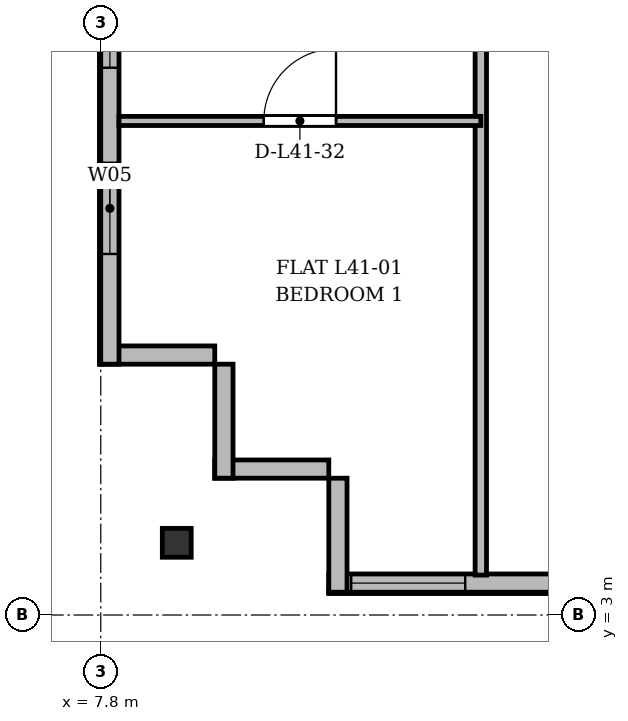
"""IFC4 building model, lengths in metres.
Left out: names, types, materials, properties, quantities, classifications, styles, units other than length and angle.
Written with IfcOpenShell. Run it as: python <this file> out.ifc"""

import sys

from ifc_helpers import new_model, si_unit, direction, frame, frame_2d, origin, origin_2d, place, context, subcontext, project, spatial, rectangle, i_section, extrude, source, transform, mapped, element, fill, save


model = new_model("IFC4")
c1 = context("Model", 3, precision=1e-05, world=origin(), true_north=direction((0.0, 1.0)))
c2 = subcontext(c1, "Body", "Model", "MODEL_VIEW")
j1 = project(units=[si_unit("LENGTHUNIT", "METRE"), si_unit("PLANEANGLEUNIT", "RADIAN")], contexts=[c1])
p1 = place(None, origin())
s1 = spatial("IfcSite", under=j1, at=p1, CompositionType="ELEMENT")
p2 = place(p1, origin())
s2 = spatial("IfcBuilding", under=s1, at=p2, CompositionType="ELEMENT")
p3 = place(p2, frame((0.0, 0.0, 157.3)))
s3 = spatial("IfcBuildingStorey", under=s2, at=p3, CompositionType="ELEMENT", Elevation=157.3)
m1 = source(origin(), c2, "Body", "SweptSolid", [
    extrude(i_section(OverallWidth=0.38, OverallDepth=0.38, WebThickness=0.02, FlangeThickness=0.03, at=origin_2d()), origin(), (0.0, 0.0, 1.0), 3.6),
])
p4 = place(p3, frame((8.8, 3.95, 0.0), z_axis=(0.0, 0.0, 1.0), x_axis=(1.0, 0.0, 0.0)))
e1 = element("IfcColumn", 1, at=p4, inside=s3, PredefinedType="COLUMN", context=c2, shape_type="MappedRepresentation", body=[
    mapped(m1, transform((0.0, 0.0, 0.0), x_axis=(1.0, 0.0, 0.0), y_axis=(0.0, 1.0, 0.0), z_axis=(0.0, 0.0, 1.0), scale=1.0)),
])
for number, where, z_axis, x_axis in (
    (2, (10.8, 4.92, 0.0), (0.0, 0.0, 1.0), (-1.0, 0.0, 0.0)),
    (3, (9.42, 4.8, 0.0), (0.0, 0.0, 1.0), (0.0, 1.0, 0.0)),
):
    element("IfcWall", number, at=place(p3, frame(where, z_axis=z_axis, x_axis=x_axis)), inside=s3, PredefinedType="SOLIDWALL", context=c2, shape_type="SweptSolid", body=[
        extrude(rectangle(XDim=1.5, YDim=0.24, at=frame_2d((0.75, 0.0))), origin(), (0.0, 0.0, 1.0), 3.35),
    ])
p5 = place(p3, frame((9.3, 6.42, 0.0), z_axis=(0.0, 0.0, 1.0), x_axis=(-1.0, 0.0, 0.0)))
e4 = element("IfcWall", 4, at=p5, inside=s3, PredefinedType="SOLIDWALL", context=c2, shape_type="SweptSolid", body=[
    extrude(rectangle(XDim=1.5, YDim=0.24, at=frame_2d((0.75, 0.0))), origin(), (0.0, 0.0, 1.0), 2.85),
])
p6 = place(p3, frame((7.92, 6.3, 0.0), z_axis=(0.0, 0.0, 1.0), x_axis=(0.0, 1.0, 0.0)))
e5 = element("IfcWall", 5, at=p6, inside=s3, PredefinedType="SOLIDWALL", context=c2, shape_type="SweptSolid", body=[
    extrude(rectangle(XDim=39.2, YDim=0.24, at=frame_2d((19.6, 0.0))), origin(), (0.0, 0.0, 1.0), 3.35),
])
p7 = place(p6, frame((1.45, 0.0, 0.92)))
e6 = element("IfcOpeningElement", 6, at=p7, cuts=e5, PredefinedType="OPENING", context=c2, shape_type="SweptSolid", body=[
    extrude(rectangle(XDim=1.2, YDim=1.65, at=frame_2d((0.6, 0.825))), frame((0.0, 0.13, 0.0), z_axis=(0.0, -1.0, 0.0), x_axis=(1.0, 0.0, 0.0)), (0.0, 0.0, 1.0), 0.26),
])
p8 = place(p6, frame((3.9, 0.0, 0.92)))
e7 = element("IfcOpeningElement", 7, at=p8, cuts=e5, PredefinedType="OPENING", context=c2, shape_type="SweptSolid", body=[
    extrude(rectangle(XDim=2.4, YDim=2.1, at=frame_2d((1.2, 1.05))), frame((0.0, 0.13, 0.0), z_axis=(0.0, -1.0, 0.0), x_axis=(1.0, 0.0, 0.0)), (0.0, 0.0, 1.0), 0.26),
])
p9 = place(p6, frame((8.1, 0.0, 0.92)))
e8 = element("IfcOpeningElement", 8, at=p9, cuts=e5, PredefinedType="OPENING", context=c2, shape_type="SweptSolid", body=[
    extrude(rectangle(XDim=2.4, YDim=2.1, at=frame_2d((1.2, 1.05))), frame((0.0, 0.13, 0.0), z_axis=(0.0, -1.0, 0.0), x_axis=(1.0, 0.0, 0.0)), (0.0, 0.0, 1.0), 0.26),
])
p10 = place(p6, frame((15.3, 0.0, 0.92)))
e9 = element("IfcOpeningElement", 9, at=p10, cuts=e5, PredefinedType="OPENING", context=c2, shape_type="SweptSolid", body=[
    extrude(rectangle(XDim=2.4, YDim=2.1, at=frame_2d((1.2, 1.05))), frame((0.0, 0.13, 0.0), z_axis=(0.0, -1.0, 0.0), x_axis=(1.0, 0.0, 0.0)), (0.0, 0.0, 1.0), 0.26),
])
p11 = place(p6, frame((29.3, 0.0, 0.92)))
e10 = element("IfcOpeningElement", 10, at=p11, cuts=e5, PredefinedType="OPENING", context=c2, shape_type="SweptSolid", body=[
    extrude(rectangle(XDim=2.4, YDim=2.1, at=frame_2d((1.2, 1.05))), frame((0.0, 0.13, 0.0), z_axis=(0.0, -1.0, 0.0), x_axis=(1.0, 0.0, 0.0)), (0.0, 0.0, 1.0), 0.26),
])
p12 = place(p6, frame((33.5, 0.0, 0.92)))
e11 = element("IfcOpeningElement", 11, at=p12, cuts=e5, PredefinedType="OPENING", context=c2, shape_type="SweptSolid", body=[
    extrude(rectangle(XDim=1.2, YDim=1.65, at=frame_2d((0.6, 0.825))), frame((0.0, 0.13, 0.0), z_axis=(0.0, -1.0, 0.0), x_axis=(1.0, 0.0, 0.0)), (0.0, 0.0, 1.0), 0.26),
])
p13 = place(p6, frame((36.85, 0.0, 0.92)))
e12 = element("IfcOpeningElement", 12, at=p13, cuts=e5, PredefinedType="OPENING", context=c2, shape_type="SweptSolid", body=[
    extrude(rectangle(XDim=1.2, YDim=1.65, at=frame_2d((0.6, 0.825))), frame((0.0, 0.13, 0.0), z_axis=(0.0, -1.0, 0.0), x_axis=(1.0, 0.0, 0.0)), (0.0, 0.0, 1.0), 0.26),
])
p14 = place(p3, frame((63.6, 3.42, 0.0), z_axis=(0.0, 0.0, 1.0), x_axis=(-1.0, 0.0, 0.0)))
e13 = element("IfcWall", 13, at=p14, inside=s3, PredefinedType="SOLIDWALL", context=c2, shape_type="SweptSolid", body=[
    extrude(rectangle(XDim=52.8, YDim=0.24, at=frame_2d((26.4, 0.0))), origin(), (0.0, 0.0, 1.0), 3.35),
])
p15 = place(p14, frame((0.295, 0.0, 0.9)))
e14 = element("IfcOpeningElement", 14, at=p15, cuts=e13, PredefinedType="OPENING", context=c2, shape_type="SweptSolid", body=[
    extrude(rectangle(XDim=1.5, YDim=1.75, at=frame_2d((0.75, 0.875))), frame((0.0, 0.13, 0.0), z_axis=(0.0, -1.0, 0.0), x_axis=(1.0, 0.0, 0.0)), (0.0, 0.0, 1.0), 0.26),
])
p16 = place(p14, frame((3.95, 0.0, 0.9)))
e15 = element("IfcOpeningElement", 15, at=p16, cuts=e13, PredefinedType="OPENING", context=c2, shape_type="SweptSolid", body=[
    extrude(rectangle(XDim=1.5, YDim=1.75, at=frame_2d((0.75, 0.875))), frame((0.0, 0.13, 0.0), z_axis=(0.0, -1.0, 0.0), x_axis=(1.0, 0.0, 0.0)), (0.0, 0.0, 1.0), 0.26),
])
p17 = place(p14, frame((7.635, 0.0, 0.0)))
e16 = element("IfcOpeningElement", 16, at=p17, cuts=e13, PredefinedType="OPENING", context=c2, shape_type="SweptSolid", body=[
    extrude(rectangle(XDim=1.2, YDim=2.2, at=frame_2d((0.6, 1.1))), frame((0.0, 0.13, 0.0), z_axis=(0.0, -1.0, 0.0), x_axis=(1.0, 0.0, 0.0)), (0.0, 0.0, 1.0), 0.26),
])
p18 = place(p14, frame((9.775, 0.0, 0.9)))
e17 = element("IfcOpeningElement", 17, at=p18, cuts=e13, PredefinedType="OPENING", context=c2, shape_type="SweptSolid", body=[
    extrude(rectangle(XDim=1.65, YDim=1.85, at=frame_2d((0.825, 0.925))), frame((0.0, 0.13, 0.0), z_axis=(0.0, -1.0, 0.0), x_axis=(1.0, 0.0, 0.0)), (0.0, 0.0, 1.0), 0.26),
])
p19 = place(p14, frame((12.1, 0.0, 0.9)))
e18 = element("IfcOpeningElement", 18, at=p19, cuts=e13, PredefinedType="OPENING", context=c2, shape_type="SweptSolid", body=[
    extrude(rectangle(XDim=1.8, YDim=1.8, at=frame_2d((0.9, 0.9))), frame((0.0, 0.13, 0.0), z_axis=(0.0, -1.0, 0.0), x_axis=(1.0, 0.0, 0.0)), (0.0, 0.0, 1.0), 0.26),
])
p20 = place(p14, frame((15.9, 0.0, 0.9)))
e19 = element("IfcOpeningElement", 19, at=p20, cuts=e13, PredefinedType="OPENING", context=c2, shape_type="SweptSolid", body=[
    extrude(rectangle(XDim=2.2, YDim=1.8, at=frame_2d((1.1, 0.9))), frame((0.0, 0.13, 0.0), z_axis=(0.0, -1.0, 0.0), x_axis=(1.0, 0.0, 0.0)), (0.0, 0.0, 1.0), 0.26),
])
p21 = place(p14, frame((22.65, 0.0, 0.9)))
e20 = element("IfcOpeningElement", 20, at=p21, cuts=e13, PredefinedType="OPENING", context=c2, shape_type="SweptSolid", body=[
    extrude(rectangle(XDim=1.5, YDim=1.75, at=frame_2d((0.75, 0.875))), frame((0.0, 0.13, 0.0), z_axis=(0.0, -1.0, 0.0), x_axis=(1.0, 0.0, 0.0)), (0.0, 0.0, 1.0), 0.26),
])
p22 = place(p14, frame((27.5, 0.0, 0.9)))
e21 = element("IfcOpeningElement", 21, at=p22, cuts=e13, PredefinedType="OPENING", context=c2, shape_type="SweptSolid", body=[
    extrude(rectangle(XDim=2.0, YDim=1.95, at=frame_2d((1.0, 0.975))), frame((0.0, 0.13, 0.0), z_axis=(0.0, -1.0, 0.0), x_axis=(1.0, 0.0, 0.0)), (0.0, 0.0, 1.0), 0.26),
])
p23 = place(p14, frame((30.675, 0.0, 0.9)))
e22 = element("IfcOpeningElement", 22, at=p23, cuts=e13, PredefinedType="OPENING", context=c2, shape_type="SweptSolid", body=[
    extrude(rectangle(XDim=1.65, YDim=1.85, at=frame_2d((0.825, 0.925))), frame((0.0, 0.13, 0.0), z_axis=(0.0, -1.0, 0.0), x_axis=(1.0, 0.0, 0.0)), (0.0, 0.0, 1.0), 0.26),
])
p24 = place(p14, frame((34.3, 0.0, 0.9)))
e23 = element("IfcOpeningElement", 23, at=p24, cuts=e13, PredefinedType="OPENING", context=c2, shape_type="SweptSolid", body=[
    extrude(rectangle(XDim=1.8, YDim=1.8, at=frame_2d((0.9, 0.9))), frame((0.0, 0.13, 0.0), z_axis=(0.0, -1.0, 0.0), x_axis=(1.0, 0.0, 0.0)), (0.0, 0.0, 1.0), 0.26),
])
p25 = place(p14, frame((39.3, 0.0, 0.9)))
e24 = element("IfcOpeningElement", 24, at=p25, cuts=e13, PredefinedType="OPENING", context=c2, shape_type="SweptSolid", body=[
    extrude(rectangle(XDim=2.2, YDim=1.8, at=frame_2d((1.1, 0.9))), frame((0.0, 0.13, 0.0), z_axis=(0.0, -1.0, 0.0), x_axis=(1.0, 0.0, 0.0)), (0.0, 0.0, 1.0), 0.26),
])
p26 = place(p14, frame((43.65, 0.0, 0.9)))
e25 = element("IfcOpeningElement", 25, at=p26, cuts=e13, PredefinedType="OPENING", context=c2, shape_type="SweptSolid", body=[
    extrude(rectangle(XDim=1.5, YDim=1.75, at=frame_2d((0.75, 0.875))), frame((0.0, 0.13, 0.0), z_axis=(0.0, -1.0, 0.0), x_axis=(1.0, 0.0, 0.0)), (0.0, 0.0, 1.0), 0.26),
])
p27 = place(p14, frame((47.1, 0.0, 0.9)))
e26 = element("IfcOpeningElement", 26, at=p27, cuts=e13, PredefinedType="OPENING", context=c2, shape_type="SweptSolid", body=[
    extrude(rectangle(XDim=2.0, YDim=1.95, at=frame_2d((1.0, 0.975))), frame((0.0, 0.13, 0.0), z_axis=(0.0, -1.0, 0.0), x_axis=(1.0, 0.0, 0.0)), (0.0, 0.0, 1.0), 0.26),
])
p28 = place(p14, frame((51.005, 0.0, 0.9)))
e27 = element("IfcOpeningElement", 27, at=p28, cuts=e13, PredefinedType="OPENING", context=c2, shape_type="SweptSolid", body=[
    extrude(rectangle(XDim=1.5, YDim=1.75, at=frame_2d((0.75, 0.875))), frame((0.0, 0.13, 0.0), z_axis=(0.0, -1.0, 0.0), x_axis=(1.0, 0.0, 0.0)), (0.0, 0.0, 1.0), 0.26),
])
p29 = place(p14, frame((37.85, 0.0, 0.0)))
e28 = element("IfcOpeningElement", 28, at=p29, cuts=e13, PredefinedType="OPENING", context=c2, shape_type="SweptSolid", body=[
    extrude(rectangle(XDim=1.2, YDim=2.2, at=frame_2d((0.6, 1.1))), frame((0.0, 0.13, 0.0), z_axis=(0.0, -1.0, 0.0), x_axis=(1.0, 0.0, 0.0)), (0.0, 0.0, 1.0), 0.26),
])
p30 = place(p3, frame((10.92, 3.3, 0.0), z_axis=(0.0, 0.0, 1.0), x_axis=(0.0, 1.0, 0.0)))
e29 = element("IfcWall", 29, at=p30, inside=s3, PredefinedType="SOLIDWALL", context=c2, shape_type="SweptSolid", body=[
    extrude(rectangle(XDim=1.5, YDim=0.24, at=frame_2d((0.75, 0.0))), origin(), (0.0, 0.0, 1.0), 2.75),
])
p31 = place(p3, frame((12.8, 3.525, 0.0), z_axis=(0.0, 0.0, 1.0), x_axis=(0.0, 1.0, 0.0)))
e30 = element("IfcWall", 30, at=p31, inside=s3, PredefinedType="PARTITIONING", context=c2, shape_type="SweptSolid", body=[
    extrude(rectangle(XDim=27.275, YDim=0.15, at=frame_2d((13.638, 0.0))), origin(), (0.0, 0.0, 1.0), 2.75),
])
p32 = place(p3, frame((8.04, 9.5, 0.0), z_axis=(0.0, 0.0, 1.0), x_axis=(1.0, 0.0, 0.0)))
e31 = element("IfcWall", 31, at=p32, inside=s3, PredefinedType="PARTITIONING", context=c2, shape_type="SweptSolid", body=[
    extrude(rectangle(XDim=4.76, YDim=0.12, at=frame_2d((2.38, 0.0))), origin(), (0.0, 0.0, 1.0), 2.85),
])
p33 = place(p32, frame((1.905, 0.0, 0.0)))
e32 = element("IfcOpeningElement", 32, at=p33, cuts=e31, PredefinedType="OPENING", context=c2, shape_type="SweptSolid", body=[
    extrude(rectangle(XDim=0.95, YDim=2.15, at=frame_2d((0.475, 1.075))), frame((0.0, 0.07, 0.0), z_axis=(0.0, -1.0, 0.0), x_axis=(1.0, 0.0, 0.0)), (0.0, 0.0, 1.0), 0.14),
])
m2 = source(origin(), c2, "Body", "SweptSolid", [
    extrude(rectangle(XDim=1.2, YDim=1.65, at=frame_2d((0.6, 0.825))), frame((0.0, 0.03, 0.0), z_axis=(0.0, -1.0, 0.0), x_axis=(1.0, 0.0, 0.0)), (0.0, 0.0, 1.0), 0.06),
])
p34 = place(p7, origin())
e33 = element("IfcWindow", 33, at=p34, inside=s3, PartitioningType="SINGLE_PANEL", PredefinedType="WINDOW", context=c2, shape_type="MappedRepresentation", body=[
    mapped(m2, transform((0.0, 0.0, 0.0), x_axis=(1.0, 0.0, 0.0), y_axis=(0.0, 1.0, 0.0), z_axis=(0.0, 0.0, 1.0), scale=1.0)),
])
fill(e6, e33)
m3 = source(origin(), c2, "Body", "SweptSolid", [
    extrude(rectangle(XDim=2.4, YDim=2.1, at=frame_2d((1.2, 1.05))), frame((0.0, 0.03, 0.0), z_axis=(0.0, -1.0, 0.0), x_axis=(1.0, 0.0, 0.0)), (0.0, 0.0, 1.0), 0.06),
])
p35 = place(p8, origin())
e34 = element("IfcWindow", 34, at=p35, inside=s3, PartitioningType="SINGLE_PANEL", PredefinedType="WINDOW", context=c2, shape_type="MappedRepresentation", body=[
    mapped(m3, transform((0.0, 0.0, 0.0), x_axis=(1.0, 0.0, 0.0), y_axis=(0.0, 1.0, 0.0), z_axis=(0.0, 0.0, 1.0), scale=1.0)),
])
fill(e7, e34)
m4 = source(origin(), c2, "Body", "SweptSolid", [
    extrude(rectangle(XDim=1.5, YDim=1.75, at=frame_2d((0.75, 0.875))), frame((0.0, 0.03, 0.0), z_axis=(0.0, -1.0, 0.0), x_axis=(1.0, 0.0, 0.0)), (0.0, 0.0, 1.0), 0.06),
])
p36 = place(p28, origin())
e35 = element("IfcWindow", 35, at=p36, inside=s3, PartitioningType="SINGLE_PANEL", PredefinedType="WINDOW", context=c2, shape_type="MappedRepresentation", body=[
    mapped(m4, transform((0.0, 0.0, 0.0), x_axis=(1.0, 0.0, 0.0), y_axis=(0.0, 1.0, 0.0), z_axis=(0.0, 0.0, 1.0), scale=1.0)),
])
fill(e27, e35)
m5 = source(origin(), c2, "Body", "SweptSolid", [
    extrude(rectangle(XDim=0.95, YDim=2.15, at=frame_2d((0.475, 1.075))), frame((0.0, 0.025, 0.0), z_axis=(0.0, -1.0, 0.0), x_axis=(1.0, 0.0, 0.0)), (0.0, 0.0, 1.0), 0.05),
])
p37 = place(p33, origin())
e36 = element("IfcDoor", 36, at=p37, inside=s3, OperationType="SINGLE_SWING_RIGHT", PredefinedType="DOOR", context=c2, shape_type="MappedRepresentation", body=[
    mapped(m5, transform((0.0, 0.0, 0.0), x_axis=(1.0, 0.0, 0.0), y_axis=(0.0, 1.0, 0.0), z_axis=(0.0, 0.0, 1.0), scale=1.0)),
])
fill(e32, e36)
save(model, sys.argv[1])
